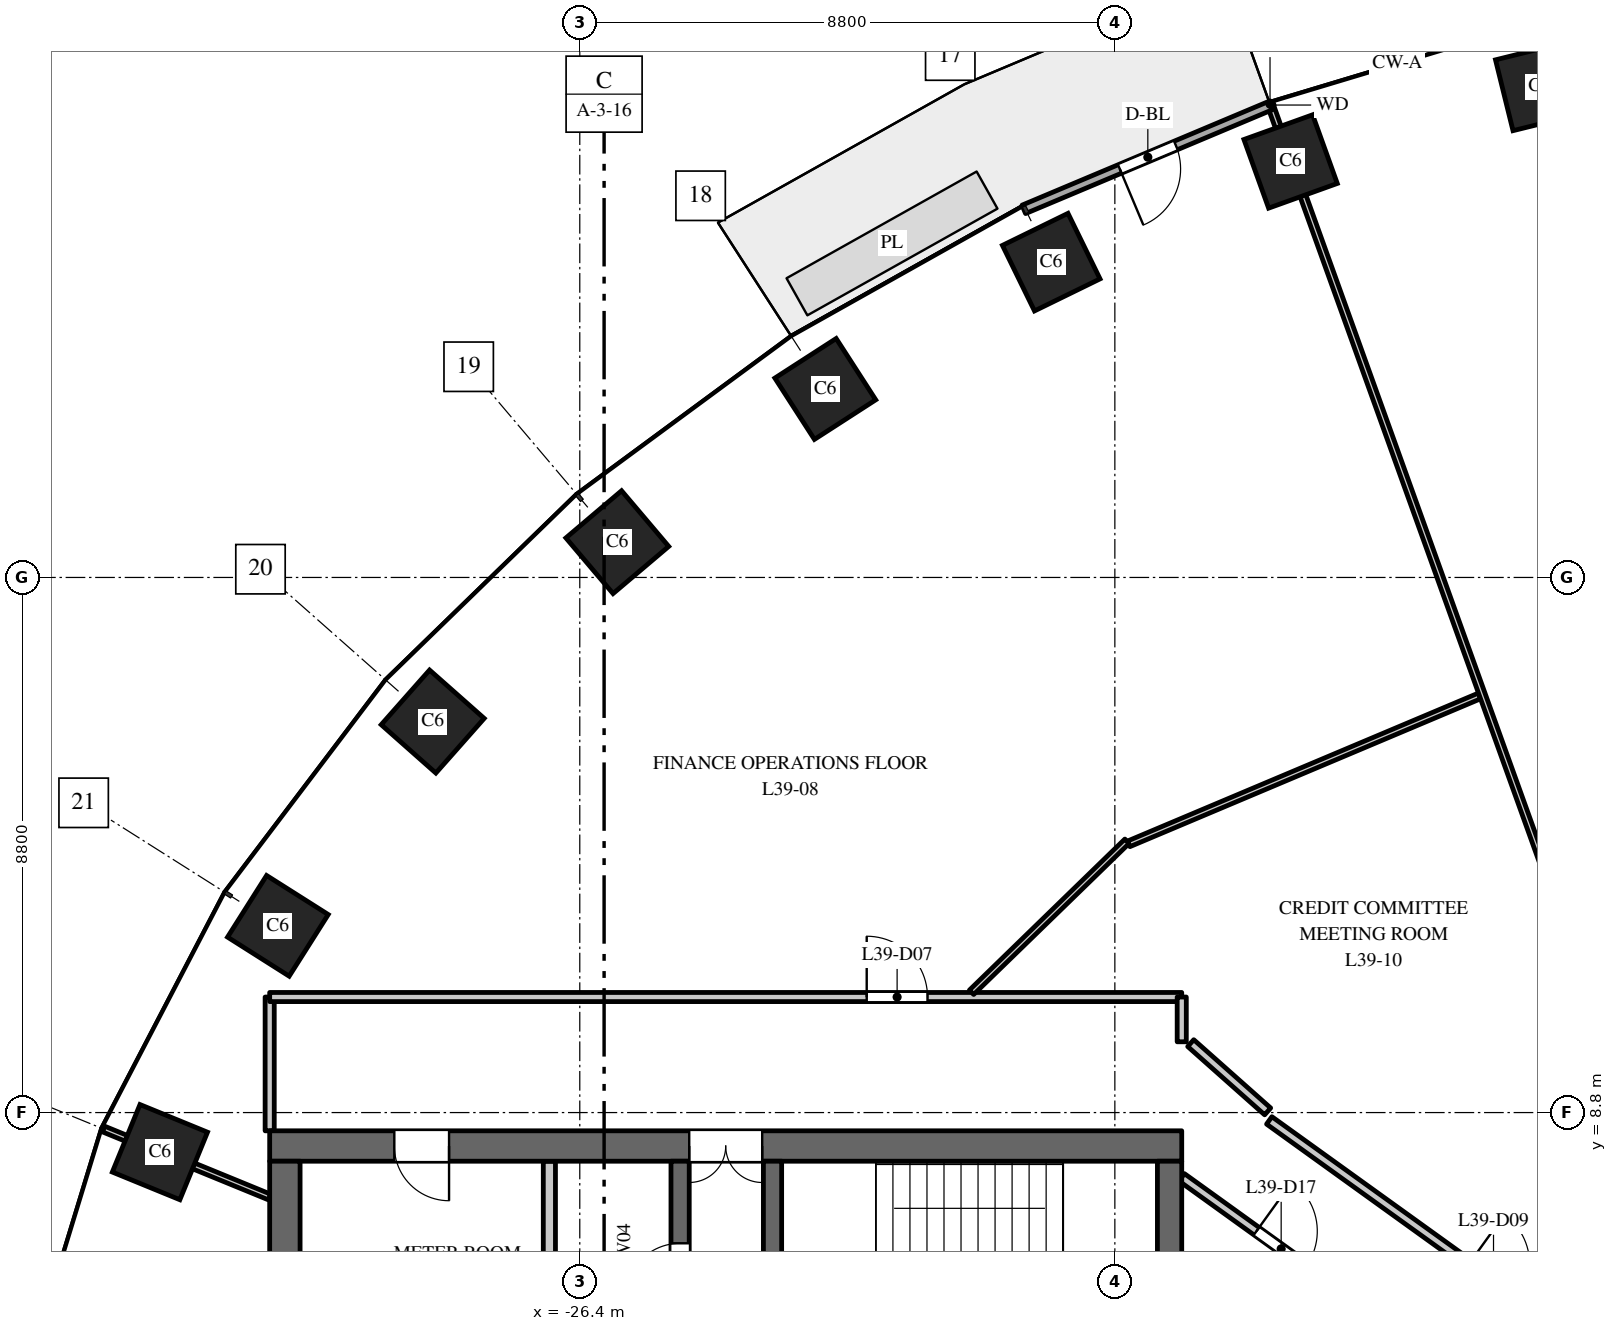
"""IFC4 building model, lengths in metres.
Left out: names, types, materials, properties, quantities, classifications, styles, units other than length and angle.
Written with IfcOpenShell. Run it as: python <this file> out.ifc"""

import sys

from ifc_helpers import new_model, si_unit, direction, frame, frame_2d, origin, origin_2d, place, context, subcontext, project, spatial, rectangle, extrude, element, fill, save


model = new_model("IFC4")
c1 = context("Model", 3, precision=1e-05, world=origin(), true_north=direction((0.0, 1.0)))
c2 = subcontext(c1, "Body", "Model", "MODEL_VIEW")
j1 = project(units=[si_unit("LENGTHUNIT", "METRE"), si_unit("PLANEANGLEUNIT", "RADIAN")], contexts=[c1])
p1 = place(None, origin())
s1 = spatial("IfcSite", under=j1, at=p1, CompositionType="ELEMENT")
p2 = place(p1, origin())
s2 = spatial("IfcBuilding", under=s1, at=p2, CompositionType="ELEMENT")
p3 = place(p2, frame((0.0, 0.0, 170.0)))
s3 = spatial("IfcBuildingStorey", under=s2, at=p3, CompositionType="ELEMENT", Elevation=170.0)
for number, where, z_axis, x_axis in (
    (1, (-10.613, 25.674, 0.0), (0.0, 0.0, 1.0), (-0.971, -0.24, 0.0)),
    (2, (-14.709, 24.441, 0.0), (0.0, 0.0, 1.0), (-0.941, -0.338, 0.0)),
    (3, (-18.646, 22.785, 0.0), (0.0, 0.0, 1.0), (-0.898, -0.439, 0.0)),
    (4, (-22.362, 20.7, 0.0), (0.0, 0.0, 1.0), (-0.84, -0.542, 0.0)),
    (5, (-25.783, 18.18, 0.0), (0.0, 0.0, 1.0), (-0.763, -0.646, 0.0)),
    (6, (-28.819, 15.23, 0.0), (0.0, 0.0, 1.0), (-0.663, -0.749, 0.0)),
    (7, (-31.365, 11.871, 0.0), (0.0, 0.0, 1.0), (-0.535, -0.845, 0.0)),
    (8, (-33.305, 8.149, 0.0), (0.0, 0.0, 1.0), (-0.379, -0.925, 0.0)),
):
    element("IfcColumn", number, at=place(p3, frame(where, z_axis=z_axis, x_axis=x_axis)), inside=s3, PredefinedType="COLUMN", context=c2, shape_type="SweptSolid", body=[
        extrude(rectangle(XDim=1.2, YDim=1.2, at=origin_2d()), origin(), (0.0, 0.0, 1.0), 4.0),
    ])
p4 = place(p3, frame((-16.5, 8.25, 0.0), z_axis=(0.0, 0.0, 1.0), x_axis=(-1.0, 0.0, 0.0)))
e9 = element("IfcWall", 9, at=p4, inside=s3, PredefinedType="SHEAR", context=c2, shape_type="SweptSolid", body=[
    extrude(rectangle(XDim=15.0, YDim=0.5, at=frame_2d((7.5, 0.0))), origin(), (0.0, 0.0, 1.0), 3.7),
])
p5 = place(p4, frame((6.9, 0.0, 0.0)))
e10 = element("IfcOpeningElement", 10, at=p5, cuts=e9, PredefinedType="OPENING", context=c2, shape_type="SweptSolid", body=[
    extrude(rectangle(XDim=1.2, YDim=2.1, at=frame_2d((0.6, 1.05))), frame((0.0, 0.26, 0.0), z_axis=(0.0, -1.0, 0.0), x_axis=(1.0, 0.0, 0.0)), (0.0, 0.0, 1.0), 0.52),
])
p6 = place(p4, frame((12.05, 0.0, 0.0)))
e11 = element("IfcOpeningElement", 11, at=p6, cuts=e9, PredefinedType="OPENING", context=c2, shape_type="SweptSolid", body=[
    extrude(rectangle(XDim=0.9, YDim=2.1, at=frame_2d((0.45, 1.05))), frame((0.0, 0.26, 0.0), z_axis=(0.0, -1.0, 0.0), x_axis=(1.0, 0.0, 0.0)), (0.0, 0.0, 1.0), 0.52),
])
p7 = place(p3, frame((-24.75, -8.0, 0.0), z_axis=(0.0, 0.0, 1.0), x_axis=(0.0, 1.0, 0.0)))
e12 = element("IfcWall", 12, at=p7, inside=s3, PredefinedType="SHEAR", context=c2, shape_type="SweptSolid", body=[
    extrude(rectangle(XDim=16.0, YDim=0.3, at=frame_2d((8.0, 0.0))), origin(), (0.0, 0.0, 1.0), 3.7),
])
p8 = place(p7, frame((4.425, 0.0, 0.0)))
e13 = element("IfcOpeningElement", 13, at=p8, cuts=e12, PredefinedType="OPENING", context=c2, shape_type="SweptSolid", body=[
    extrude(rectangle(XDim=1.1, YDim=2.1, at=frame_2d((0.55, 1.05))), frame((0.0, 0.16, 0.0), z_axis=(0.0, -1.0, 0.0), x_axis=(1.0, 0.0, 0.0)), (0.0, 0.0, 1.0), 0.32),
])
p9 = place(p7, frame((7.45, 0.0, 0.0)))
e14 = element("IfcOpeningElement", 14, at=p9, cuts=e12, PredefinedType="OPENING", context=c2, shape_type="SweptSolid", body=[
    extrude(rectangle(XDim=1.1, YDim=2.1, at=frame_2d((0.55, 1.05))), frame((0.0, 0.16, 0.0), z_axis=(0.0, -1.0, 0.0), x_axis=(1.0, 0.0, 0.0)), (0.0, 0.0, 1.0), 0.32),
])
p10 = place(p7, frame((10.475, 0.0, 0.0)))
e15 = element("IfcOpeningElement", 15, at=p10, cuts=e12, PredefinedType="OPENING", context=c2, shape_type="SweptSolid", body=[
    extrude(rectangle(XDim=1.1, YDim=2.1, at=frame_2d((0.55, 1.05))), frame((0.0, 0.16, 0.0), z_axis=(0.0, -1.0, 0.0), x_axis=(1.0, 0.0, 0.0)), (0.0, 0.0, 1.0), 0.32),
])
p11 = place(p7, frame((13.75, 0.0, 0.0)))
e16 = element("IfcOpeningElement", 16, at=p11, cuts=e12, PredefinedType="OPENING", context=c2, shape_type="SweptSolid", body=[
    extrude(rectangle(XDim=0.9, YDim=2.1, at=frame_2d((0.45, 1.05))), frame((0.0, 0.16, 0.0), z_axis=(0.0, -1.0, 0.0), x_axis=(1.0, 0.0, 0.0)), (0.0, 0.0, 1.0), 0.32),
])
p12 = place(p7, frame((1.35, 0.0, 0.0)))
e17 = element("IfcOpeningElement", 17, at=p12, cuts=e12, PredefinedType="OPENING", context=c2, shape_type="SweptSolid", body=[
    extrude(rectangle(XDim=0.9, YDim=2.1, at=frame_2d((0.45, 1.05))), frame((0.0, 0.16, 0.0), z_axis=(0.0, -1.0, 0.0), x_axis=(1.0, 0.0, 0.0)), (0.0, 0.0, 1.0), 0.32),
])
p13 = place(p3, frame((-16.7, -8.0, 0.0), z_axis=(0.0, 0.0, 1.0), x_axis=(0.0, 1.0, 0.0)))
e18 = element("IfcWall", 18, at=p13, inside=s3, PredefinedType="SHEAR", context=c2, shape_type="SweptSolid", body=[
    extrude(rectangle(XDim=16.0, YDim=0.4, at=frame_2d((8.0, 0.0))), origin(), (0.0, 0.0, 1.0), 3.7),
])
p14 = place(p3, frame((-31.25, -8.0, 0.0), z_axis=(0.0, 0.0, 1.0), x_axis=(0.0, 1.0, 0.0)))
e19 = element("IfcWall", 19, at=p14, inside=s3, PredefinedType="SHEAR", context=c2, shape_type="SweptSolid", body=[
    extrude(rectangle(XDim=16.0, YDim=0.5, at=frame_2d((8.0, 0.0))), origin(), (0.0, 0.0, 1.0), 3.7),
])
p15 = place(p3, frame((-26.9, 4.75, 0.0), z_axis=(0.0, 0.0, 1.0), x_axis=(0.0, 1.0, 0.0)))
e20 = element("IfcWall", 20, at=p15, inside=s3, PredefinedType="PARTITIONING", context=c2, shape_type="SweptSolid", body=[
    extrude(rectangle(XDim=3.25, YDim=0.2, at=frame_2d((1.625, 0.0))), origin(), (0.0, 0.0, 1.0), 3.7),
])
p16 = place(p3, frame((-23.23, 2.25, 0.0), z_axis=(0.0, 0.0, 1.0), x_axis=(0.0, 1.0, 0.0)))
e21 = element("IfcWall", 21, at=p16, inside=s3, PredefinedType="SHEAR", context=c2, shape_type="SweptSolid", body=[
    extrude(rectangle(XDim=5.75, YDim=0.3, at=frame_2d((2.875, 0.0))), origin(), (0.0, 0.0, 1.0), 3.7),
])
p17 = place(p16, frame((0.6, 0.0, 0.0)))
e22 = element("IfcOpeningElement", 22, at=p17, cuts=e21, PredefinedType="OPENING", context=c2, shape_type="SweptSolid", body=[
    extrude(rectangle(XDim=1.0, YDim=2.1, at=frame_2d((0.5, 1.05))), frame((0.0, 0.16, 0.0), z_axis=(0.0, -1.0, 0.0), x_axis=(1.0, 0.0, 0.0)), (0.0, 0.0, 1.0), 0.32),
])
p18 = place(p3, frame((-15.018, 25.369, 0.0), z_axis=(0.0, 0.0, 1.0), x_axis=(-0.921816985161, -0.387625393736, 0.0)))
e23 = element("IfcWall", 23, at=p18, inside=s3, PredefinedType="STANDARD", context=c2, shape_type="SweptSolid", body=[
    extrude(rectangle(XDim=4.426, YDim=0.15, at=frame_2d((2.213, 0.0))), origin(), (0.0, 0.0, 1.0), 3.7),
])
p19 = place(p18, frame((1.713, 0.0, 0.0)))
e24 = element("IfcOpeningElement", 24, at=p19, cuts=e23, PredefinedType="OPENING", context=c2, shape_type="SweptSolid", body=[
    extrude(rectangle(XDim=1.0, YDim=2.4, at=frame_2d((0.5, 1.2))), frame((0.0, 0.085, 0.0), z_axis=(0.0, -1.0, 0.0), x_axis=(1.0, 0.0, 0.0)), (0.0, 0.0, 1.0), 0.17),
])
p20 = place(p3, frame((-34.234, 8.53, 0.0), z_axis=(0.0, 0.0, 1.0), x_axis=(0.925344112436, -0.379128307542, 0.0)))
e25 = element("IfcWall", 25, at=p20, inside=s3, PredefinedType="PARTITIONING", context=c2, shape_type="SweptSolid", body=[
    extrude(rectangle(XDim=2.954, YDim=0.1, at=frame_2d((1.477, 0.0))), origin(), (0.0, 0.0, 1.0), 2.9),
])
p21 = place(p3, frame((-31.5, 8.5, 0.0), z_axis=(0.0, 0.0, 1.0), x_axis=(0.0, 1.0, 0.0)))
e26 = element("IfcWall", 26, at=p21, inside=s3, PredefinedType="PARTITIONING", context=c2, shape_type="SweptSolid", body=[
    extrude(rectangle(XDim=2.2, YDim=0.15, at=frame_2d((1.1, 0.0))), origin(), (0.0, 0.0, 1.0), 3.7),
])
p22 = place(p3, frame((-31.5, 10.7, 0.0), z_axis=(0.0, 0.0, 1.0), x_axis=(1.0, 0.0, 0.0)))
e27 = element("IfcWall", 27, at=p22, inside=s3, PredefinedType="PARTITIONING", context=c2, shape_type="SweptSolid", body=[
    extrude(rectangle(XDim=15.0, YDim=0.15, at=frame_2d((7.5, 0.0))), origin(), (0.0, 0.0, 1.0), 3.1),
])
p23 = place(p22, frame((9.819, 0.0, 0.0)))
e28 = element("IfcOpeningElement", 28, at=p23, cuts=e27, PredefinedType="OPENING", context=c2, shape_type="SweptSolid", body=[
    extrude(rectangle(XDim=1.0, YDim=2.1, at=frame_2d((0.5, 1.05))), frame((0.0, 0.085, 0.0), z_axis=(0.0, -1.0, 0.0), x_axis=(1.0, 0.0, 0.0)), (0.0, 0.0, 1.0), 0.17),
])
p24 = place(p3, frame((-19.957, 10.778, 0.0), z_axis=(0.0, 0.0, 1.0), x_axis=(0.717304806733, 0.696759509614, 0.0)))
e29 = element("IfcWall", 29, at=p24, inside=s3, PredefinedType="PARTITIONING", context=c2, shape_type="SweptSolid", body=[
    extrude(rectangle(XDim=3.565, YDim=0.1, at=frame_2d((1.782, 0.0))), origin(), (0.0, 0.0, 1.0), 2.75),
])
p25 = place(p3, frame((-17.372, 13.219, 0.0), z_axis=(0.0, 0.0, 1.0), x_axis=(0.921428289763, 0.38854846136, 0.0)))
e30 = element("IfcWall", 30, at=p25, inside=s3, PredefinedType="PARTITIONING", context=c2, shape_type="SweptSolid", body=[
    extrude(rectangle(XDim=6.262, YDim=0.1, at=frame_2d((3.131, 0.0))), origin(), (0.0, 0.0, 1.0), 2.85),
])
p26 = place(p3, frame((-16.5, 9.964, 0.0), z_axis=(0.0, 0.0, 1.0), x_axis=(0.0, 1.0, 0.0)))
e31 = element("IfcWall", 31, at=p26, inside=s3, PredefinedType="PARTITIONING", context=c2, shape_type="SweptSolid", body=[
    extrude(rectangle(XDim=0.736, YDim=0.15, at=frame_2d((0.368, 0.0))), origin(), (0.0, 0.0, 1.0), 3.7),
])
p27 = place(p3, frame((-16.5, 7.735, 0.0), z_axis=(0.0, 0.0, 1.0), x_axis=(0.811616692984, -0.584190331715, 0.0)))
e32 = element("IfcWall", 32, at=p27, inside=s3, PredefinedType="PARTITIONING", context=c2, shape_type="SweptSolid", body=[
    extrude(rectangle(XDim=6.578, YDim=0.15, at=frame_2d((3.289, 0.0))), origin(), (0.0, 0.0, 1.0), 3.7),
])
p28 = place(p27, frame((1.515, 0.0, 0.0)))
e33 = element("IfcOpeningElement", 33, at=p28, cuts=e32, PredefinedType="OPENING", context=c2, shape_type="SweptSolid", body=[
    extrude(rectangle(XDim=1.0, YDim=2.1, at=frame_2d((0.5, 1.05))), frame((0.0, 0.085, 0.0), z_axis=(0.0, -1.0, 0.0), x_axis=(1.0, 0.0, 0.0)), (0.0, 0.0, 1.0), 0.17),
])
p29 = place(p3, frame((-15.061, 8.671, 0.0), z_axis=(0.0, 0.0, 1.0), x_axis=(0.811697765448, -0.584077681106, 0.0)))
e34 = element("IfcWall", 34, at=p29, inside=s3, PredefinedType="PARTITIONING", context=c2, shape_type="SweptSolid", body=[
    extrude(rectangle(XDim=5.694, YDim=0.15, at=frame_2d((2.847, 0.0))), origin(), (0.0, 0.0, 1.0), 3.7),
])
p30 = place(p29, frame((4.044, 0.0, 0.0)))
e35 = element("IfcOpeningElement", 35, at=p30, cuts=e34, PredefinedType="OPENING", context=c2, shape_type="SweptSolid", body=[
    extrude(rectangle(XDim=1.0, YDim=2.1, at=frame_2d((0.5, 1.05))), frame((0.0, 0.085, 0.0), z_axis=(0.0, -1.0, 0.0), x_axis=(1.0, 0.0, 0.0)), (0.0, 0.0, 1.0), 0.17),
])
p31 = place(p3, frame((-15.048, 25.383, 0.0), z_axis=(0.0, 0.0, 1.0), x_axis=(0.33832146485, -0.941030598026, 0.0)))
e36 = element("IfcWall", 36, at=p31, inside=s3, PredefinedType="PARTITIONING", context=c2, shape_type="SweptSolid", body=[
    extrude(rectangle(XDim=18.964, YDim=0.1, at=frame_2d((9.482, 0.0))), origin(), (0.0, 0.0, 1.0), 2.85),
])
p32 = place(p3, frame((-16.352, 9.942, 0.0), z_axis=(0.0, 0.0, 1.0), x_axis=(0.747926695066, -0.663781333579, 0.0)))
e37 = element("IfcWall", 37, at=p32, inside=s3, PredefinedType="PARTITIONING", context=c2, shape_type="SweptSolid", body=[
    extrude(rectangle(XDim=1.691, YDim=0.15, at=frame_2d((0.846, 0.0))), origin(), (0.0, 0.0, 1.0), 3.7),
])
p33 = place(p5, origin())
e38 = element("IfcDoor", 38, at=p33, inside=s3, OperationType="DOUBLE_DOOR_DOUBLE_SWING", PredefinedType="DOOR", context=c2, shape_type="SweptSolid", body=[
    extrude(rectangle(XDim=1.2, YDim=2.1, at=frame_2d((0.6, 1.05))), frame((0.0, 0.025, 0.0), z_axis=(0.0, -1.0, 0.0), x_axis=(1.0, 0.0, 0.0)), (0.0, 0.0, 1.0), 0.05),
])
fill(e10, e38)
p34 = place(p11, origin())
e39 = element("IfcDoor", 39, at=p34, inside=s3, OperationType="SINGLE_SWING_RIGHT", PredefinedType="DOOR", context=c2, shape_type="SweptSolid", body=[
    extrude(rectangle(XDim=0.9, YDim=2.1, at=frame_2d((0.45, 1.05))), frame((0.0, 0.025, 0.0), z_axis=(0.0, -1.0, 0.0), x_axis=(1.0, 0.0, 0.0)), (0.0, 0.0, 1.0), 0.05),
])
fill(e16, e39)
p35 = place(p6, origin())
e40 = element("IfcDoor", 40, at=p35, inside=s3, OperationType="SINGLE_SWING_RIGHT", PredefinedType="DOOR", context=c2, shape_type="SweptSolid", body=[
    extrude(rectangle(XDim=0.9, YDim=2.1, at=frame_2d((0.45, 1.05))), frame((0.0, 0.025, 0.0), z_axis=(0.0, -1.0, 0.0), x_axis=(1.0, 0.0, 0.0)), (0.0, 0.0, 1.0), 0.05),
])
fill(e11, e40)
p36 = place(p19, origin())
e41 = element("IfcDoor", 41, at=p36, inside=s3, OperationType="SINGLE_SWING_RIGHT", PredefinedType="DOOR", context=c2, shape_type="SweptSolid", body=[
    extrude(rectangle(XDim=1.0, YDim=2.4, at=frame_2d((0.5, 1.2))), frame((0.0, 0.025, 0.0), z_axis=(0.0, -1.0, 0.0), x_axis=(1.0, 0.0, 0.0)), (0.0, 0.0, 1.0), 0.05),
])
fill(e24, e41)
p37 = place(p23, origin())
e42 = element("IfcDoor", 42, at=p37, inside=s3, OperationType="SINGLE_SWING_LEFT", PredefinedType="DOOR", context=c2, shape_type="SweptSolid", body=[
    extrude(rectangle(XDim=1.0, YDim=2.1, at=frame_2d((0.5, 1.05))), frame((0.0, 0.025, 0.0), z_axis=(0.0, -1.0, 0.0), x_axis=(1.0, 0.0, 0.0)), (0.0, 0.0, 1.0), 0.05),
])
fill(e28, e42)
p38 = place(p28, origin())
e43 = element("IfcDoor", 43, at=p38, inside=s3, OperationType="SINGLE_SWING_LEFT", PredefinedType="DOOR", context=c2, shape_type="SweptSolid", body=[
    extrude(rectangle(XDim=1.0, YDim=2.1, at=frame_2d((0.5, 1.05))), frame((0.0, 0.025, 0.0), z_axis=(0.0, -1.0, 0.0), x_axis=(1.0, 0.0, 0.0)), (0.0, 0.0, 1.0), 0.05),
])
fill(e33, e43)
save(model, sys.argv[1])
